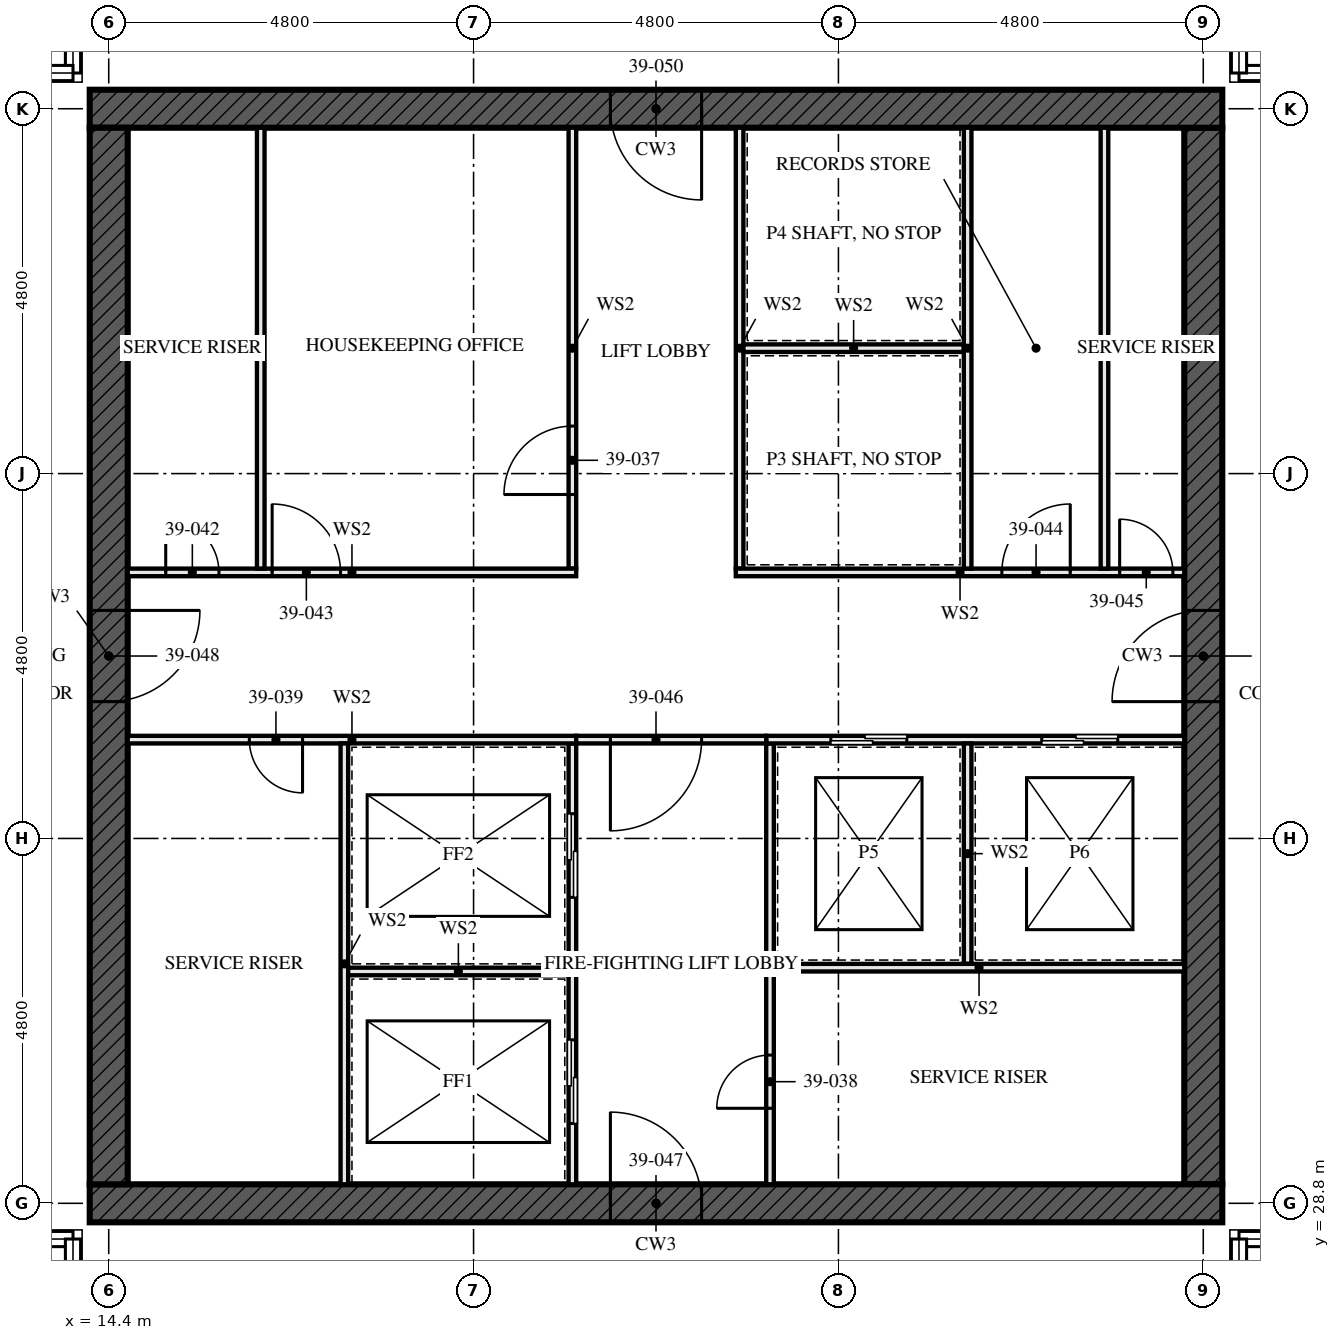
"""IFC4 building model, lengths in metres.
Left out: names, types, materials, properties, quantities, classifications, styles, units other than length and angle.
Written with IfcOpenShell. Run it as: python <this file> out.ifc"""

import sys

from ifc_helpers import new_model, si_unit, direction, frame, frame_2d, origin, place, context, subcontext, project, spatial, rectangle, extrude, element, fill, save


model = new_model("IFC4")
c1 = context("Model", 3, precision=1e-05, world=origin(), true_north=direction((0.0, 1.0)))
c2 = subcontext(c1, "Body", "Model", "MODEL_VIEW")
j1 = project(units=[si_unit("LENGTHUNIT", "METRE"), si_unit("PLANEANGLEUNIT", "RADIAN")], contexts=[c1])
p1 = place(None, origin())
s1 = spatial("IfcSite", under=j1, at=p1, CompositionType="ELEMENT")
p2 = place(p1, origin())
s2 = spatial("IfcBuilding", under=s1, at=p2, CompositionType="ELEMENT")
p3 = place(p2, frame((0.0, 0.0, 144.5)))
s3 = spatial("IfcBuildingStorey", under=s2, at=p3, CompositionType="ELEMENT", Elevation=144.5)
p4 = place(p3, frame((14.15, 28.8, -0.17), z_axis=(0.0, 0.0, 1.0), x_axis=(1.0, 0.0, 0.0)))
e1 = element("IfcWall", 1, at=p4, inside=s3, PredefinedType="SHEAR", context=c2, shape_type="SweptSolid", body=[
    extrude(rectangle(XDim=14.9, YDim=0.5, at=frame_2d((7.45, 0.0))), origin(), (0.0, 0.0, 1.0), 3.5),
])
p5 = place(p4, frame((6.85, 0.0, 0.17)))
e2 = element("IfcOpeningElement", 2, at=p5, cuts=e1, PredefinedType="OPENING", context=c2, shape_type="SweptSolid", body=[
    extrude(rectangle(XDim=1.2, YDim=2.1, at=frame_2d((0.6, 1.05))), frame((0.0, 0.26, 0.0), z_axis=(0.0, -1.0, 0.0), x_axis=(1.0, 0.0, 0.0)), (0.0, 0.0, 1.0), 0.521),
])
p6 = place(p3, frame((29.05, 43.2, -0.17), z_axis=(0.0, 0.0, 1.0), x_axis=(-1.0, 0.0, 0.0)))
e3 = element("IfcWall", 3, at=p6, inside=s3, PredefinedType="SHEAR", context=c2, shape_type="SweptSolid", body=[
    extrude(rectangle(XDim=14.9, YDim=0.5, at=frame_2d((7.45, 0.0))), origin(), (0.0, 0.0, 1.0), 3.5),
])
p7 = place(p6, frame((6.85, 0.0, 0.17)))
e4 = element("IfcOpeningElement", 4, at=p7, cuts=e3, PredefinedType="OPENING", context=c2, shape_type="SweptSolid", body=[
    extrude(rectangle(XDim=1.2, YDim=2.1, at=frame_2d((0.6, 1.05))), frame((0.0, 0.26, 0.0), z_axis=(0.0, -1.0, 0.0), x_axis=(1.0, 0.0, 0.0)), (0.0, 0.0, 1.0), 0.521),
])
p8 = place(p3, frame((14.4, 42.95, -0.17), z_axis=(0.0, 0.0, 1.0), x_axis=(0.0, -1.0, 0.0)))
e5 = element("IfcWall", 5, at=p8, inside=s3, PredefinedType="SHEAR", context=c2, shape_type="SweptSolid", body=[
    extrude(rectangle(XDim=13.9, YDim=0.5, at=frame_2d((6.95, 0.0))), origin(), (0.0, 0.0, 1.0), 3.5),
])
p9 = place(p8, frame((6.35, 0.0, 0.17)))
e6 = element("IfcOpeningElement", 6, at=p9, cuts=e5, PredefinedType="OPENING", context=c2, shape_type="SweptSolid", body=[
    extrude(rectangle(XDim=1.2, YDim=2.1, at=frame_2d((0.6, 1.05))), frame((0.0, 0.26, 0.0), z_axis=(0.0, -1.0, 0.0), x_axis=(1.0, 0.0, 0.0)), (0.0, 0.0, 1.0), 0.521),
])
p10 = place(p3, frame((28.8, 29.05, -0.17), z_axis=(0.0, 0.0, 1.0), x_axis=(0.0, 1.0, 0.0)))
e7 = element("IfcWall", 7, at=p10, inside=s3, PredefinedType="SHEAR", context=c2, shape_type="SweptSolid", body=[
    extrude(rectangle(XDim=13.9, YDim=0.5, at=frame_2d((6.95, 0.0))), origin(), (0.0, 0.0, 1.0), 3.5),
])
p11 = place(p10, frame((6.35, 0.0, 0.17)))
e8 = element("IfcOpeningElement", 8, at=p11, cuts=e7, PredefinedType="OPENING", context=c2, shape_type="SweptSolid", body=[
    extrude(rectangle(XDim=1.2, YDim=2.1, at=frame_2d((0.6, 1.05))), frame((0.0, 0.26, 0.0), z_axis=(0.0, -1.0, 0.0), x_axis=(1.0, 0.0, 0.0)), (0.0, 0.0, 1.0), 0.521),
])
for number, where, z_axis, x_axis in (
    (9, (16.4, 37.15, 0.0), (0.0, 0.0, 1.0), (0.0, 1.0, 0.0)),
    (10, (27.5, 37.15, 0.0), (0.0, 0.0, 1.0), (0.0, 1.0, 0.0)),
):
    element("IfcWall", number, at=place(p3, frame(where, z_axis=z_axis, x_axis=x_axis)), inside=s3, PredefinedType="SOLIDWALL", context=c2, shape_type="SweptSolid", body=[
        extrude(rectangle(XDim=5.8, YDim=0.1, at=frame_2d((2.9, 0.0))), origin(), (0.0, 0.0, 1.0), 3.33),
    ])
p12 = place(p3, frame((20.5, 29.05, 0.0), z_axis=(0.0, 0.0, 1.0), x_axis=(0.0, 1.0, 0.0)))
e11 = element("IfcWall", 11, at=p12, inside=s3, PredefinedType="SOLIDWALL", context=c2, shape_type="SweptSolid", body=[
    extrude(rectangle(XDim=5.8, YDim=0.1, at=frame_2d((2.9, 0.0))), origin(), (0.0, 0.0, 1.0), 3.33),
])
p13 = place(p12, frame((0.8, 0.0, 0.0)))
e12 = element("IfcOpeningElement", 12, at=p13, cuts=e11, PredefinedType="OPENING", context=c2, shape_type="SweptSolid", body=[
    extrude(rectangle(XDim=1.1, YDim=2.3, at=frame_2d((0.55, 1.15))), frame((0.0, 0.061, 0.0), z_axis=(0.0, -1.0, 0.0), x_axis=(1.0, 0.0, 0.0)), (0.0, 0.0, 1.0), 0.121),
])
p14 = place(p12, frame((3.775, 0.0, 0.0)))
e13 = element("IfcOpeningElement", 13, at=p14, cuts=e11, PredefinedType="OPENING", context=c2, shape_type="SweptSolid", body=[
    extrude(rectangle(XDim=1.1, YDim=2.3, at=frame_2d((0.55, 1.15))), frame((0.0, 0.061, 0.0), z_axis=(0.0, -1.0, 0.0), x_axis=(1.0, 0.0, 0.0)), (0.0, 0.0, 1.0), 0.121),
])
p15 = place(p3, frame((20.5, 37.15, 0.0), z_axis=(0.0, 0.0, 1.0), x_axis=(0.0, 1.0, 0.0)))
e14 = element("IfcWall", 14, at=p15, inside=s3, PredefinedType="SOLIDWALL", context=c2, shape_type="SweptSolid", body=[
    extrude(rectangle(XDim=5.8, YDim=0.1, at=frame_2d((2.9, 0.0))), origin(), (0.0, 0.0, 1.0), 3.33),
])
p16 = place(p15, frame((0.975, 0.0, 0.0)))
e15 = element("IfcOpeningElement", 15, at=p16, cuts=e14, PredefinedType="OPENING", context=c2, shape_type="SweptSolid", body=[
    extrude(rectangle(XDim=0.9, YDim=2.1, at=frame_2d((0.45, 1.05))), frame((0.0, 0.061, 0.0), z_axis=(0.0, -1.0, 0.0), x_axis=(1.0, 0.0, 0.0)), (0.0, 0.0, 1.0), 0.121),
])
p17 = place(p3, frame((22.7, 37.15, 0.0), z_axis=(0.0, 0.0, 1.0), x_axis=(0.0, 1.0, 0.0)))
e16 = element("IfcWall", 16, at=p17, inside=s3, PredefinedType="SOLIDWALL", context=c2, shape_type="SweptSolid", body=[
    extrude(rectangle(XDim=5.8, YDim=0.1, at=frame_2d((2.9, 0.0))), origin(), (0.0, 0.0, 1.0), 3.33),
])
p18 = place(p3, frame((23.1, 29.05, 0.0), z_axis=(0.0, 0.0, 1.0), x_axis=(0.0, 1.0, 0.0)))
e17 = element("IfcWall", 17, at=p18, inside=s3, PredefinedType="SOLIDWALL", context=c2, shape_type="SweptSolid", body=[
    extrude(rectangle(XDim=5.8, YDim=0.1, at=frame_2d((2.9, 0.0))), origin(), (0.0, 0.0, 1.0), 3.33),
])
p19 = place(p18, frame((1.0, 0.0, 0.0)))
e18 = element("IfcOpeningElement", 18, at=p19, cuts=e17, PredefinedType="OPENING", context=c2, shape_type="SweptSolid", body=[
    extrude(rectangle(XDim=0.7, YDim=2.1, at=frame_2d((0.35, 1.05))), frame((0.0, 0.061, 0.0), z_axis=(0.0, -1.0, 0.0), x_axis=(1.0, 0.0, 0.0)), (0.0, 0.0, 1.0), 0.121),
])
p20 = place(p3, frame((14.65, 34.9, 0.0), z_axis=(0.0, 0.0, 1.0), x_axis=(1.0, 0.0, 0.0)))
e19 = element("IfcWall", 19, at=p20, inside=s3, PredefinedType="SOLIDWALL", context=c2, shape_type="SweptSolid", body=[
    extrude(rectangle(XDim=5.9, YDim=0.1, at=frame_2d((2.95, 0.0))), origin(), (0.0, 0.0, 1.0), 3.33),
])
p21 = place(p20, frame((1.6, 0.0, 0.0)))
e20 = element("IfcOpeningElement", 20, at=p21, cuts=e19, PredefinedType="OPENING", context=c2, shape_type="SweptSolid", body=[
    extrude(rectangle(XDim=0.7, YDim=2.1, at=frame_2d((0.35, 1.05))), frame((0.0, 0.061, 0.0), z_axis=(0.0, -1.0, 0.0), x_axis=(1.0, 0.0, 0.0)), (0.0, 0.0, 1.0), 0.121),
])
p22 = place(p3, frame((23.05, 34.9, 0.0), z_axis=(0.0, 0.0, 1.0), x_axis=(1.0, 0.0, 0.0)))
e21 = element("IfcWall", 21, at=p22, inside=s3, PredefinedType="SOLIDWALL", context=c2, shape_type="SweptSolid", body=[
    extrude(rectangle(XDim=5.5, YDim=0.1, at=frame_2d((2.75, 0.0))), origin(), (0.0, 0.0, 1.0), 3.33),
])
p23 = place(p22, frame((0.85, 0.0, 0.0)))
e22 = element("IfcOpeningElement", 22, at=p23, cuts=e21, PredefinedType="OPENING", context=c2, shape_type="SweptSolid", body=[
    extrude(rectangle(XDim=1.0, YDim=2.1, at=frame_2d((0.5, 1.05))), frame((0.0, 0.061, 0.0), z_axis=(0.0, -1.0, 0.0), x_axis=(1.0, 0.0, 0.0)), (0.0, 0.0, 1.0), 0.121),
])
p24 = place(p22, frame((3.625, 0.0, 0.0)))
e23 = element("IfcOpeningElement", 23, at=p24, cuts=e21, PredefinedType="OPENING", context=c2, shape_type="SweptSolid", body=[
    extrude(rectangle(XDim=1.0, YDim=2.1, at=frame_2d((0.5, 1.05))), frame((0.0, 0.061, 0.0), z_axis=(0.0, -1.0, 0.0), x_axis=(1.0, 0.0, 0.0)), (0.0, 0.0, 1.0), 0.121),
])
p25 = place(p3, frame((14.65, 37.1, 0.0), z_axis=(0.0, 0.0, 1.0), x_axis=(1.0, 0.0, 0.0)))
e24 = element("IfcWall", 24, at=p25, inside=s3, PredefinedType="SOLIDWALL", context=c2, shape_type="SweptSolid", body=[
    extrude(rectangle(XDim=5.9, YDim=0.1, at=frame_2d((2.95, 0.0))), origin(), (0.0, 0.0, 1.0), 3.33),
])
p26 = place(p25, frame((0.5, 0.0, 0.0)))
e25 = element("IfcOpeningElement", 25, at=p26, cuts=e24, PredefinedType="OPENING", context=c2, shape_type="SweptSolid", body=[
    extrude(rectangle(XDim=0.7, YDim=2.1, at=frame_2d((0.35, 1.05))), frame((0.0, 0.061, 0.0), z_axis=(0.0, -1.0, 0.0), x_axis=(1.0, 0.0, 0.0)), (0.0, 0.0, 1.0), 0.121),
])
p27 = place(p25, frame((1.9, 0.0, 0.0)))
e26 = element("IfcOpeningElement", 26, at=p27, cuts=e24, PredefinedType="OPENING", context=c2, shape_type="SweptSolid", body=[
    extrude(rectangle(XDim=0.9, YDim=2.1, at=frame_2d((0.45, 1.05))), frame((0.0, 0.061, 0.0), z_axis=(0.0, -1.0, 0.0), x_axis=(1.0, 0.0, 0.0)), (0.0, 0.0, 1.0), 0.121),
])
p28 = place(p3, frame((22.65, 37.1, 0.0), z_axis=(0.0, 0.0, 1.0), x_axis=(1.0, 0.0, 0.0)))
e27 = element("IfcWall", 27, at=p28, inside=s3, PredefinedType="SOLIDWALL", context=c2, shape_type="SweptSolid", body=[
    extrude(rectangle(XDim=5.9, YDim=0.1, at=frame_2d((2.95, 0.0))), origin(), (0.0, 0.0, 1.0), 3.33),
])
p29 = place(p28, frame((3.5, 0.0, 0.0)))
e28 = element("IfcOpeningElement", 28, at=p29, cuts=e27, PredefinedType="OPENING", context=c2, shape_type="SweptSolid", body=[
    extrude(rectangle(XDim=0.9, YDim=2.1, at=frame_2d((0.45, 1.05))), frame((0.0, 0.061, 0.0), z_axis=(0.0, -1.0, 0.0), x_axis=(1.0, 0.0, 0.0)), (0.0, 0.0, 1.0), 0.121),
])
p30 = place(p28, frame((5.05, 0.0, 0.0)))
e29 = element("IfcOpeningElement", 29, at=p30, cuts=e27, PredefinedType="OPENING", context=c2, shape_type="SweptSolid", body=[
    extrude(rectangle(XDim=0.7, YDim=2.1, at=frame_2d((0.35, 1.05))), frame((0.0, 0.061, 0.0), z_axis=(0.0, -1.0, 0.0), x_axis=(1.0, 0.0, 0.0)), (0.0, 0.0, 1.0), 0.121),
])
p31 = place(p3, frame((20.55, 34.9, 0.0), z_axis=(0.0, 0.0, 1.0), x_axis=(1.0, 0.0, 0.0)))
e30 = element("IfcWall", 30, at=p31, inside=s3, PredefinedType="SOLIDWALL", context=c2, shape_type="SweptSolid", body=[
    extrude(rectangle(XDim=2.5, YDim=0.1, at=frame_2d((1.25, 0.0))), origin(), (0.0, 0.0, 1.0), 3.33),
])
p32 = place(p31, frame((0.45, 0.0, 0.0)))
e31 = element("IfcOpeningElement", 31, at=p32, cuts=e30, PredefinedType="OPENING", context=c2, shape_type="SweptSolid", body=[
    extrude(rectangle(XDim=1.2, YDim=2.1, at=frame_2d((0.6, 1.05))), frame((0.0, 0.061, 0.0), z_axis=(0.0, -1.0, 0.0), x_axis=(1.0, 0.0, 0.0)), (0.0, 0.0, 1.0), 0.121),
])
p33 = place(p3, frame((17.5, 29.05, 0.0), z_axis=(0.0, 0.0, 1.0), x_axis=(0.0, 1.0, 0.0)))
e32 = element("IfcWall", 32, at=p33, inside=s3, PredefinedType="SOLIDWALL", context=c2, shape_type="SweptSolid", body=[
    extrude(rectangle(XDim=5.8, YDim=0.1, at=frame_2d((2.9, 0.0))), origin(), (0.0, 0.0, 1.0), 3.33),
])
for number, where, z_axis, x_axis in (
    (33, (17.55, 31.85, 0.0), (0.0, 0.0, 1.0), (1.0, 0.0, 0.0)),
    (34, (22.75, 40.05, 0.0), (0.0, 0.0, 1.0), (1.0, 0.0, 0.0)),
):
    element("IfcWall", number, at=place(p3, frame(where, z_axis=z_axis, x_axis=x_axis)), inside=s3, PredefinedType="SOLIDWALL", context=c2, shape_type="SweptSolid", body=[
        extrude(rectangle(XDim=2.9, YDim=0.1, at=frame_2d((1.45, 0.0))), origin(), (0.0, 0.0, 1.0), 3.33),
    ])
p34 = place(p3, frame((25.7, 37.15, 0.0), z_axis=(0.0, 0.0, 1.0), x_axis=(0.0, 1.0, 0.0)))
e35 = element("IfcWall", 35, at=p34, inside=s3, PredefinedType="SOLIDWALL", context=c2, shape_type="SweptSolid", body=[
    extrude(rectangle(XDim=5.8, YDim=0.1, at=frame_2d((2.9, 0.0))), origin(), (0.0, 0.0, 1.0), 3.33),
])
p35 = place(p3, frame((25.7, 31.95, 0.0), z_axis=(0.0, 0.0, 1.0), x_axis=(0.0, 1.0, 0.0)))
e36 = element("IfcWall", 36, at=p35, inside=s3, PredefinedType="SOLIDWALL", context=c2, shape_type="SweptSolid", body=[
    extrude(rectangle(XDim=2.9, YDim=0.1, at=frame_2d((1.45, 0.0))), origin(), (0.0, 0.0, 1.0), 3.33),
])
p36 = place(p3, frame((23.15, 31.9, 0.0), z_axis=(0.0, 0.0, 1.0), x_axis=(1.0, 0.0, 0.0)))
e37 = element("IfcWall", 37, at=p36, inside=s3, PredefinedType="SOLIDWALL", context=c2, shape_type="SweptSolid", body=[
    extrude(rectangle(XDim=5.4, YDim=0.1, at=frame_2d((2.7, 0.0))), origin(), (0.0, 0.0, 1.0), 3.33),
])
p37 = place(p13, origin())
e38 = element("IfcDoor", 38, at=p37, inside=s3, OperationType="SLIDING_TO_LEFT", PredefinedType="DOOR", context=c2, shape_type="SweptSolid", body=[
    extrude(rectangle(XDim=1.1, YDim=2.3, at=frame_2d((0.55, 1.15))), frame((0.0, 0.05, 0.0), z_axis=(0.0, -1.0, 0.0), x_axis=(1.0, 0.0, 0.0)), (0.0, 0.0, 1.0), 0.1),
])
fill(e12, e38)
p38 = place(p14, origin())
e39 = element("IfcDoor", 39, at=p38, inside=s3, OperationType="SLIDING_TO_LEFT", PredefinedType="DOOR", context=c2, shape_type="SweptSolid", body=[
    extrude(rectangle(XDim=1.1, YDim=2.3, at=frame_2d((0.55, 1.15))), frame((0.0, 0.05, 0.0), z_axis=(0.0, -1.0, 0.0), x_axis=(1.0, 0.0, 0.0)), (0.0, 0.0, 1.0), 0.1),
])
fill(e13, e39)
p39 = place(p16, origin())
e40 = element("IfcDoor", 40, at=p39, inside=s3, OperationType="SINGLE_SWING_RIGHT", PredefinedType="DOOR", context=c2, shape_type="SweptSolid", body=[
    extrude(rectangle(XDim=0.9, YDim=2.1, at=frame_2d((0.45, 1.05))), frame((0.0, 0.027, 0.0), z_axis=(0.0, -1.0, 0.0), x_axis=(1.0, 0.0, 0.0)), (0.0, 0.0, 1.0), 0.054),
])
fill(e15, e40)
p40 = place(p19, origin())
e41 = element("IfcDoor", 41, at=p40, inside=s3, OperationType="SINGLE_SWING_RIGHT", PredefinedType="DOOR", context=c2, shape_type="SweptSolid", body=[
    extrude(rectangle(XDim=0.7, YDim=2.1, at=frame_2d((0.35, 1.05))), frame((0.0, 0.027, 0.0), z_axis=(0.0, -1.0, 0.0), x_axis=(1.0, 0.0, 0.0)), (0.0, 0.0, 1.0), 0.054),
])
fill(e18, e41)
p41 = place(p21, frame((0.7, 0.0, 0.0), z_axis=(0.0, 0.0, 1.0), x_axis=(-1.0, 0.0, 0.0)))
e42 = element("IfcDoor", 42, at=p41, inside=s3, OperationType="SINGLE_SWING_RIGHT", PredefinedType="DOOR", context=c2, shape_type="SweptSolid", body=[
    extrude(rectangle(XDim=0.7, YDim=2.1, at=frame_2d((0.35, 1.05))), frame((0.0, 0.027, 0.0), z_axis=(0.0, -1.0, 0.0), x_axis=(1.0, 0.0, 0.0)), (0.0, 0.0, 1.0), 0.054),
])
fill(e20, e42)
p42 = place(p23, origin())
e43 = element("IfcDoor", 43, at=p42, inside=s3, OperationType="SLIDING_TO_LEFT", PredefinedType="DOOR", context=c2, shape_type="SweptSolid", body=[
    extrude(rectangle(XDim=1.0, YDim=2.1, at=frame_2d((0.5, 1.05))), frame((0.0, 0.05, 0.0), z_axis=(0.0, -1.0, 0.0), x_axis=(1.0, 0.0, 0.0)), (0.0, 0.0, 1.0), 0.1),
])
fill(e22, e43)
p43 = place(p24, origin())
e44 = element("IfcDoor", 44, at=p43, inside=s3, OperationType="SLIDING_TO_LEFT", PredefinedType="DOOR", context=c2, shape_type="SweptSolid", body=[
    extrude(rectangle(XDim=1.0, YDim=2.1, at=frame_2d((0.5, 1.05))), frame((0.0, 0.05, 0.0), z_axis=(0.0, -1.0, 0.0), x_axis=(1.0, 0.0, 0.0)), (0.0, 0.0, 1.0), 0.1),
])
fill(e23, e44)
p44 = place(p26, origin())
e45 = element("IfcDoor", 45, at=p44, inside=s3, OperationType="SINGLE_SWING_RIGHT", PredefinedType="DOOR", context=c2, shape_type="SweptSolid", body=[
    extrude(rectangle(XDim=0.7, YDim=2.1, at=frame_2d((0.35, 1.05))), frame((0.0, 0.027, 0.0), z_axis=(0.0, -1.0, 0.0), x_axis=(1.0, 0.0, 0.0)), (0.0, 0.0, 1.0), 0.054),
])
fill(e25, e45)
p45 = place(p27, origin())
e46 = element("IfcDoor", 46, at=p45, inside=s3, OperationType="SINGLE_SWING_RIGHT", PredefinedType="DOOR", context=c2, shape_type="SweptSolid", body=[
    extrude(rectangle(XDim=0.9, YDim=2.1, at=frame_2d((0.45, 1.05))), frame((0.0, 0.027, 0.0), z_axis=(0.0, -1.0, 0.0), x_axis=(1.0, 0.0, 0.0)), (0.0, 0.0, 1.0), 0.054),
])
fill(e26, e46)
p46 = place(p29, origin())
e47 = element("IfcDoor", 47, at=p46, inside=s3, OperationType="SINGLE_SWING_LEFT", PredefinedType="DOOR", context=c2, shape_type="SweptSolid", body=[
    extrude(rectangle(XDim=0.9, YDim=2.1, at=frame_2d((0.45, 1.05))), frame((0.0, 0.027, 0.0), z_axis=(0.0, -1.0, 0.0), x_axis=(1.0, 0.0, 0.0)), (0.0, 0.0, 1.0), 0.054),
])
fill(e28, e47)
p47 = place(p30, origin())
e48 = element("IfcDoor", 48, at=p47, inside=s3, OperationType="SINGLE_SWING_RIGHT", PredefinedType="DOOR", context=c2, shape_type="SweptSolid", body=[
    extrude(rectangle(XDim=0.7, YDim=2.1, at=frame_2d((0.35, 1.05))), frame((0.0, 0.027, 0.0), z_axis=(0.0, -1.0, 0.0), x_axis=(1.0, 0.0, 0.0)), (0.0, 0.0, 1.0), 0.054),
])
fill(e29, e48)
p48 = place(p32, frame((1.2, 0.0, 0.0), z_axis=(0.0, 0.0, 1.0), x_axis=(-1.0, 0.0, 0.0)))
e49 = element("IfcDoor", 49, at=p48, inside=s3, OperationType="SINGLE_SWING_LEFT", PredefinedType="DOOR", context=c2, shape_type="SweptSolid", body=[
    extrude(rectangle(XDim=1.2, YDim=2.1, at=frame_2d((0.6, 1.05))), frame((0.0, 0.027, 0.0), z_axis=(0.0, -1.0, 0.0), x_axis=(1.0, 0.0, 0.0)), (0.0, 0.0, 1.0), 0.054),
])
fill(e31, e49)
p49 = place(p5, origin())
e50 = element("IfcDoor", 50, at=p49, inside=s3, OperationType="SINGLE_SWING_LEFT", PredefinedType="DOOR", context=c2, shape_type="SweptSolid", body=[
    extrude(rectangle(XDim=1.2, YDim=2.1, at=frame_2d((0.6, 1.05))), frame((0.0, 0.027, 0.0), z_axis=(0.0, -1.0, 0.0), x_axis=(1.0, 0.0, 0.0)), (0.0, 0.0, 1.0), 0.054),
])
fill(e2, e50)
p50 = place(p9, origin())
e51 = element("IfcDoor", 51, at=p50, inside=s3, OperationType="SINGLE_SWING_LEFT", PredefinedType="DOOR", context=c2, shape_type="SweptSolid", body=[
    extrude(rectangle(XDim=1.2, YDim=2.1, at=frame_2d((0.6, 1.05))), frame((0.0, 0.027, 0.0), z_axis=(0.0, -1.0, 0.0), x_axis=(1.0, 0.0, 0.0)), (0.0, 0.0, 1.0), 0.054),
])
fill(e6, e51)
p51 = place(p11, origin())
e52 = element("IfcDoor", 52, at=p51, inside=s3, OperationType="SINGLE_SWING_LEFT", PredefinedType="DOOR", context=c2, shape_type="SweptSolid", body=[
    extrude(rectangle(XDim=1.2, YDim=2.1, at=frame_2d((0.6, 1.05))), frame((0.0, 0.027, 0.0), z_axis=(0.0, -1.0, 0.0), x_axis=(1.0, 0.0, 0.0)), (0.0, 0.0, 1.0), 0.054),
])
fill(e8, e52)
p52 = place(p7, origin())
e53 = element("IfcDoor", 53, at=p52, inside=s3, OperationType="SINGLE_SWING_LEFT", PredefinedType="DOOR", context=c2, shape_type="SweptSolid", body=[
    extrude(rectangle(XDim=1.2, YDim=2.1, at=frame_2d((0.6, 1.05))), frame((0.0, 0.027, 0.0), z_axis=(0.0, -1.0, 0.0), x_axis=(1.0, 0.0, 0.0)), (0.0, 0.0, 1.0), 0.054),
])
fill(e4, e53)
save(model, sys.argv[1])
